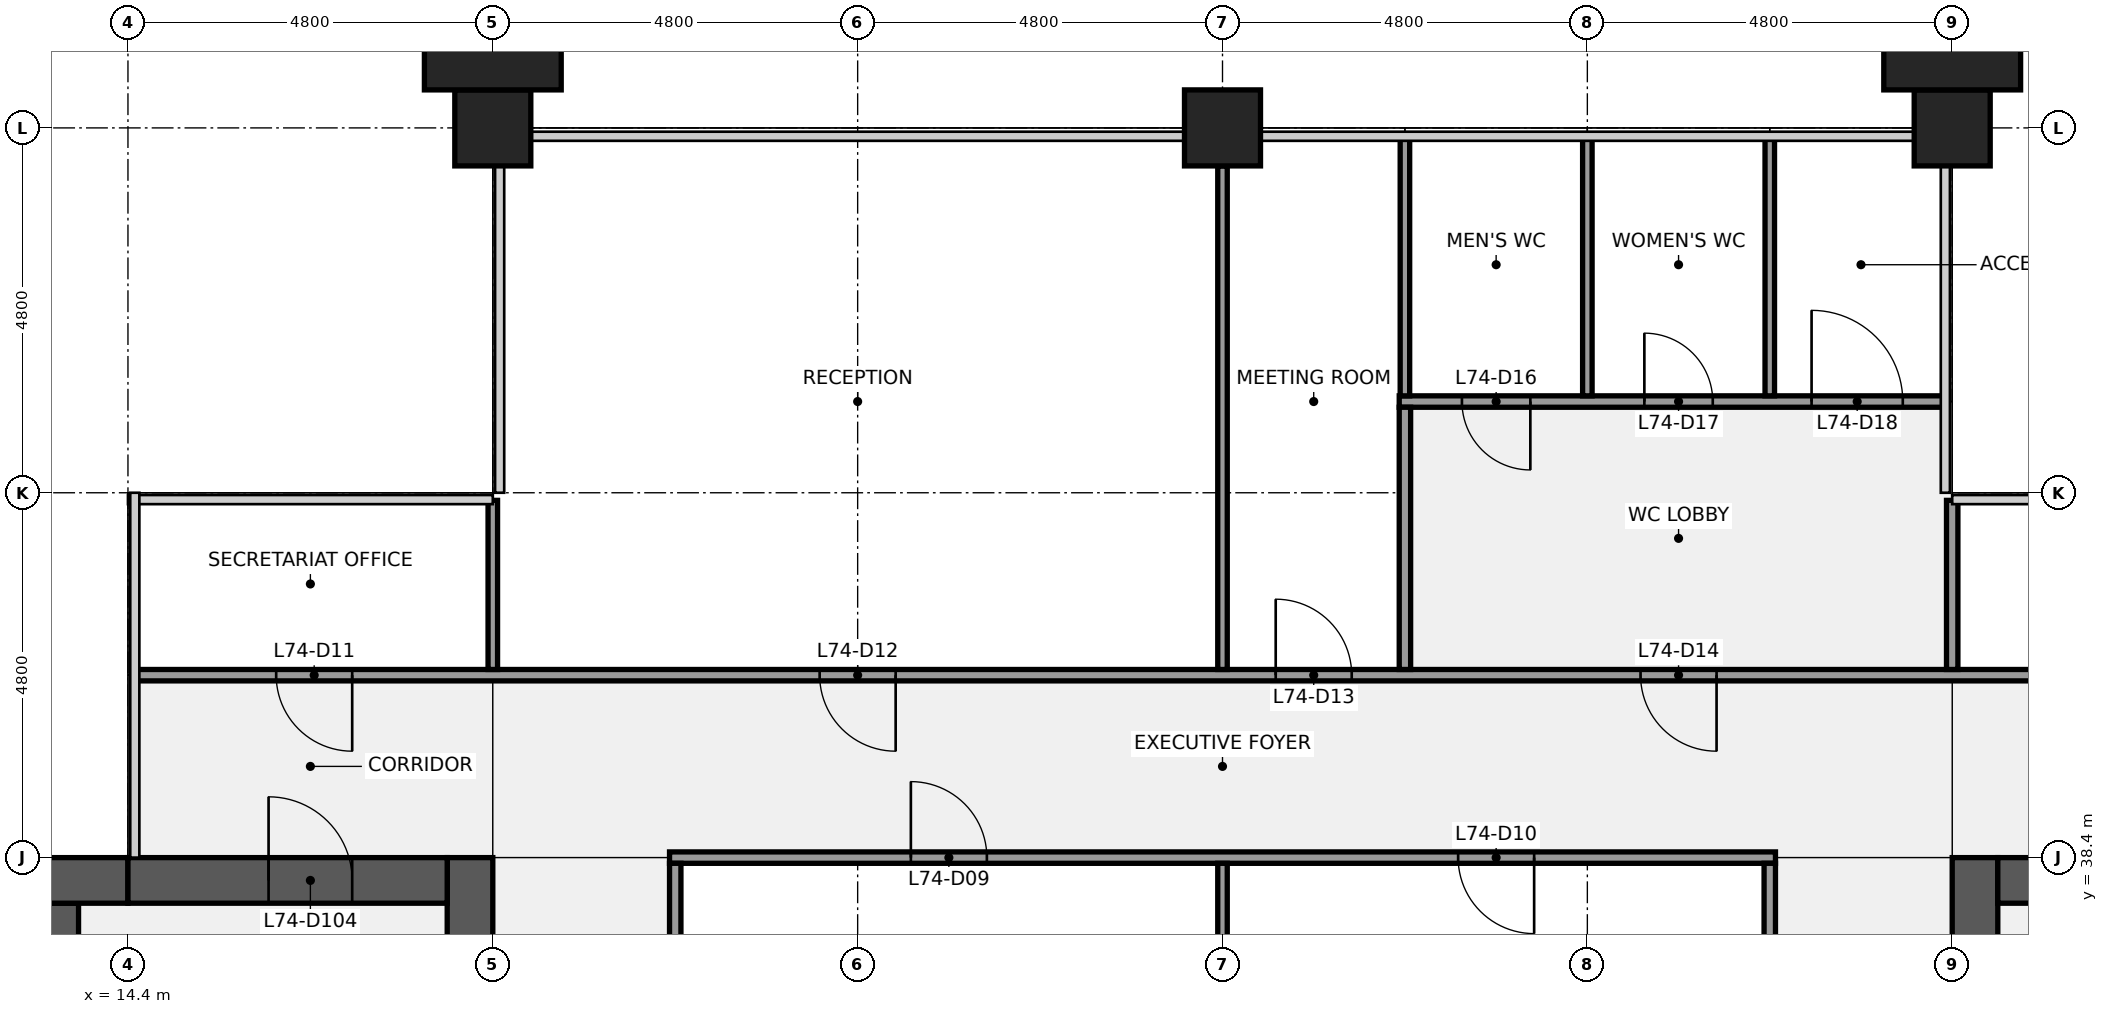
"""IFC4 building model, lengths in metres.
Left out: names, types, materials, properties, quantities, classifications, styles, units other than length and angle.
Written with IfcOpenShell. Run it as: python <this file> out.ifc"""

import sys

from ifc_helpers import new_model, si_unit, direction, frame, frame_2d, origin, origin_2d, place, context, subcontext, project, spatial, rectangle, extrude, element, fill, save


model = new_model("IFC4")
c1 = context("Model", 3, precision=1e-05, world=origin(), true_north=direction((0.0, 1.0)))
c2 = subcontext(c1, "Body", "Model", "MODEL_VIEW")
j1 = project(units=[si_unit("LENGTHUNIT", "METRE"), si_unit("PLANEANGLEUNIT", "RADIAN")], contexts=[c1])
p1 = place(None, origin())
s1 = spatial("IfcSite", under=j1, at=p1, CompositionType="ELEMENT")
p2 = place(p1, origin())
s2 = spatial("IfcBuilding", under=s1, at=p2, CompositionType="ELEMENT")
p3 = place(p2, frame((0.0, 0.0, 334.3)))
s3 = spatial("IfcBuildingStorey", under=s2, at=p3, CompositionType="ELEMENT", Elevation=334.3)
for number, where, z_axis, x_axis in (
    (1, (19.2, 48.0, 0.0), (0.0, 0.0, 1.0), (1.0, 0.0, 0.0)),
    (2, (28.8, 48.0, 0.0), (0.0, 0.0, 1.0), (1.0, 0.0, 0.0)),
    (3, (38.4, 48.0, 0.0), (0.0, 0.0, 1.0), (1.0, 0.0, 0.0)),
):
    element("IfcColumn", number, at=place(p3, frame(where, z_axis=z_axis, x_axis=x_axis)), inside=s3, PredefinedType="COLUMN", context=c2, shape_type="SweptSolid", body=[
        extrude(rectangle(XDim=1.0, YDim=1.0, at=origin_2d()), origin(), (0.0, 0.0, 1.0), 4.0),
    ])
p4 = place(p3, frame((18.9, 38.4, 0.0), z_axis=(0.0, 0.0, 1.0), x_axis=(0.0, -1.0, 0.0)))
e4 = element("IfcWall", 4, at=p4, inside=s3, PredefinedType="SHEAR", context=c2, shape_type="SweptSolid", body=[
    extrude(rectangle(XDim=28.8, YDim=0.6, at=frame_2d((14.4, 0.0))), origin(), (0.0, 0.0, 1.0), 3.84),
])
p5 = place(p4, frame((18.3, 0.0, 0.0)))
e5 = element("IfcOpeningElement", 5, at=p5, cuts=e4, PredefinedType="OPENING", context=c2, shape_type="SweptSolid", body=[
    extrude(rectangle(XDim=1.8, YDim=2.1, at=frame_2d((0.9, 1.05))), frame((0.0, 0.31, 0.0), z_axis=(0.0, -1.0, 0.0), x_axis=(1.0, 0.0, 0.0)), (0.0, 0.0, 1.0), 0.62),
])
p6 = place(p4, frame((8.7, 0.0, 0.0)))
e6 = element("IfcOpeningElement", 6, at=p6, cuts=e4, PredefinedType="OPENING", context=c2, shape_type="SweptSolid", body=[
    extrude(rectangle(XDim=1.8, YDim=2.1, at=frame_2d((0.9, 1.05))), frame((0.0, 0.31, 0.0), z_axis=(0.0, -1.0, 0.0), x_axis=(1.0, 0.0, 0.0)), (0.0, 0.0, 1.0), 0.62),
])
p7 = place(p3, frame((6.25, 37.5, 0.0), z_axis=(0.0, 0.0, 1.0), x_axis=(1.0, 0.0, 0.0)))
e7 = element("IfcWall", 7, at=p7, inside=s3, PredefinedType="SHEAR", context=c2, shape_type="SweptSolid", body=[
    extrude(rectangle(XDim=7.5, YDim=0.6, at=frame_2d((3.75, 0.0))), origin(), (0.0, 0.0, 1.0), 3.84),
])
p8 = place(p3, frame((0.6, 38.1, 0.0), z_axis=(0.0, 0.0, 1.0), x_axis=(1.0, 0.0, 0.0)))
e8 = element("IfcWall", 8, at=p8, inside=s3, PredefinedType="SHEAR", context=c2, shape_type="SweptSolid", body=[
    extrude(rectangle(XDim=13.8, YDim=0.6, at=frame_2d((6.9, 0.0))), origin(), (0.0, 0.0, 1.0), 3.84),
])
p9 = place(p8, frame((5.7, 0.0, 0.9)))
e9 = element("IfcOpeningElement", 9, at=p9, cuts=e8, PredefinedType="OPENING", context=c2, shape_type="SweptSolid", body=[
    extrude(rectangle(XDim=1.8, YDim=1.5, at=frame_2d((0.9, 0.75))), frame((0.0, 0.31, 0.0), z_axis=(0.0, -1.0, 0.0), x_axis=(1.0, 0.0, 0.0)), (0.0, 0.0, 1.0), 0.62),
])
p10 = place(p8, frame((10.5, 0.0, 0.9)))
e10 = element("IfcOpeningElement", 10, at=p10, cuts=e8, PredefinedType="OPENING", context=c2, shape_type="SweptSolid", body=[
    extrude(rectangle(XDim=1.8, YDim=1.5, at=frame_2d((0.9, 0.75))), frame((0.0, 0.31, 0.0), z_axis=(0.0, -1.0, 0.0), x_axis=(1.0, 0.0, 0.0)), (0.0, 0.0, 1.0), 0.62),
])
p11 = place(p3, frame((14.4, 38.1, 0.0), z_axis=(0.0, 0.0, 1.0), x_axis=(1.0, 0.0, 0.0)))
e11 = element("IfcWall", 11, at=p11, inside=s3, PredefinedType="SHEAR", context=c2, shape_type="SweptSolid", body=[
    extrude(rectangle(XDim=4.2, YDim=0.6, at=frame_2d((2.1, 0.0))), origin(), (0.0, 0.0, 1.0), 3.84),
])
p12 = place(p11, frame((1.85, 0.0, 0.0)))
e12 = element("IfcOpeningElement", 12, at=p12, cuts=e11, PredefinedType="OPENING", context=c2, shape_type="SweptSolid", body=[
    extrude(rectangle(XDim=1.1, YDim=2.1, at=frame_2d((0.55, 1.05))), frame((0.0, 0.31, 0.0), z_axis=(0.0, -1.0, 0.0), x_axis=(1.0, 0.0, 0.0)), (0.0, 0.0, 1.0), 0.62),
])
p13 = place(p3, frame((38.7, 9.6, 0.0), z_axis=(0.0, 0.0, 1.0), x_axis=(0.0, 1.0, 0.0)))
e13 = element("IfcWall", 13, at=p13, inside=s3, PredefinedType="SHEAR", context=c2, shape_type="SweptSolid", body=[
    extrude(rectangle(XDim=28.8, YDim=0.6, at=frame_2d((14.4, 0.0))), origin(), (0.0, 0.0, 1.0), 3.84),
])
p14 = place(p13, frame((8.7, 0.0, 0.0)))
e14 = element("IfcOpeningElement", 14, at=p14, cuts=e13, PredefinedType="OPENING", context=c2, shape_type="SweptSolid", body=[
    extrude(rectangle(XDim=1.8, YDim=2.1, at=frame_2d((0.9, 1.05))), frame((0.0, 0.31, 0.0), z_axis=(0.0, -1.0, 0.0), x_axis=(1.0, 0.0, 0.0)), (0.0, 0.0, 1.0), 0.62),
])
p15 = place(p13, frame((18.3, 0.0, 0.0)))
e15 = element("IfcOpeningElement", 15, at=p15, cuts=e13, PredefinedType="OPENING", context=c2, shape_type="SweptSolid", body=[
    extrude(rectangle(XDim=1.8, YDim=2.1, at=frame_2d((0.9, 1.05))), frame((0.0, 0.31, 0.0), z_axis=(0.0, -1.0, 0.0), x_axis=(1.0, 0.0, 0.0)), (0.0, 0.0, 1.0), 0.62),
])
p16 = place(p3, frame((39.0, 38.1, 0.0), z_axis=(0.0, 0.0, 1.0), x_axis=(1.0, 0.0, 0.0)))
e16 = element("IfcWall", 16, at=p16, inside=s3, PredefinedType="SHEAR", context=c2, shape_type="SweptSolid", body=[
    extrude(rectangle(XDim=4.2, YDim=0.6, at=frame_2d((2.1, 0.0))), origin(), (0.0, 0.0, 1.0), 3.84),
])
p17 = place(p16, frame((1.25, 0.0, 0.0)))
e17 = element("IfcOpeningElement", 17, at=p17, cuts=e16, PredefinedType="OPENING", context=c2, shape_type="SweptSolid", body=[
    extrude(rectangle(XDim=1.1, YDim=2.1, at=frame_2d((0.55, 1.05))), frame((0.0, 0.31, 0.0), z_axis=(0.0, -1.0, 0.0), x_axis=(1.0, 0.0, 0.0)), (0.0, 0.0, 1.0), 0.62),
])
p18 = place(p3, frame((21.525, 38.4, 0.0), z_axis=(0.0, 0.0, 1.0), x_axis=(1.0, 0.0, 0.0)))
e18 = element("IfcWall", 18, at=p18, inside=s3, PredefinedType="PARTITIONING", context=c2, shape_type="SweptSolid", body=[
    extrude(rectangle(XDim=14.55, YDim=0.15, at=frame_2d((7.275, 0.0))), origin(), (0.0, 0.0, 1.0), 2.849),
])
p19 = place(p18, frame((3.175, 0.0, 0.0)))
e19 = element("IfcOpeningElement", 19, at=p19, cuts=e18, PredefinedType="OPENING", context=c2, shape_type="SweptSolid", body=[
    extrude(rectangle(XDim=1.0, YDim=2.1, at=frame_2d((0.5, 1.05))), frame((0.0, 0.085, 0.0), z_axis=(0.0, -1.0, 0.0), x_axis=(1.0, 0.0, 0.0)), (0.0, 0.0, 1.0), 0.17),
])
p20 = place(p18, frame((10.375, 0.0, 0.0)))
e20 = element("IfcOpeningElement", 20, at=p20, cuts=e18, PredefinedType="OPENING", context=c2, shape_type="SweptSolid", body=[
    extrude(rectangle(XDim=1.0, YDim=2.1, at=frame_2d((0.5, 1.05))), frame((0.0, 0.085, 0.0), z_axis=(0.0, -1.0, 0.0), x_axis=(1.0, 0.0, 0.0)), (0.0, 0.0, 1.0), 0.17),
])
p21 = place(p3, frame((14.5, 40.8, 0.0), z_axis=(0.0, 0.0, 1.0), x_axis=(1.0, 0.0, 0.0)))
e21 = element("IfcWall", 21, at=p21, inside=s3, PredefinedType="PARTITIONING", context=c2, shape_type="SweptSolid", body=[
    extrude(rectangle(XDim=28.6, YDim=0.15, at=frame_2d((14.3, 0.0))), origin(), (0.0, 0.0, 1.0), 2.849),
])
p22 = place(p21, frame((1.85, 0.0, 0.0)))
e22 = element("IfcOpeningElement", 22, at=p22, cuts=e21, PredefinedType="OPENING", context=c2, shape_type="SweptSolid", body=[
    extrude(rectangle(XDim=1.0, YDim=2.1, at=frame_2d((0.5, 1.05))), frame((0.0, 0.085, 0.0), z_axis=(0.0, -1.0, 0.0), x_axis=(1.0, 0.0, 0.0)), (0.0, 0.0, 1.0), 0.17),
])
p23 = place(p21, frame((9.0, 0.0, 0.0)))
e23 = element("IfcOpeningElement", 23, at=p23, cuts=e21, PredefinedType="OPENING", context=c2, shape_type="SweptSolid", body=[
    extrude(rectangle(XDim=1.0, YDim=2.1, at=frame_2d((0.5, 1.05))), frame((0.0, 0.085, 0.0), z_axis=(0.0, -1.0, 0.0), x_axis=(1.0, 0.0, 0.0)), (0.0, 0.0, 1.0), 0.17),
])
p24 = place(p21, frame((15.0, 0.0, 0.0)))
e24 = element("IfcOpeningElement", 24, at=p24, cuts=e21, PredefinedType="OPENING", context=c2, shape_type="SweptSolid", body=[
    extrude(rectangle(XDim=1.0, YDim=2.1, at=frame_2d((0.5, 1.05))), frame((0.0, 0.085, 0.0), z_axis=(0.0, -1.0, 0.0), x_axis=(1.0, 0.0, 0.0)), (0.0, 0.0, 1.0), 0.17),
])
p25 = place(p21, frame((19.8, 0.0, 0.0)))
e25 = element("IfcOpeningElement", 25, at=p25, cuts=e21, PredefinedType="OPENING", context=c2, shape_type="SweptSolid", body=[
    extrude(rectangle(XDim=1.0, YDim=2.1, at=frame_2d((0.5, 1.05))), frame((0.0, 0.085, 0.0), z_axis=(0.0, -1.0, 0.0), x_axis=(1.0, 0.0, 0.0)), (0.0, 0.0, 1.0), 0.17),
])
p26 = place(p21, frame((25.75, 0.0, 0.0)))
e26 = element("IfcOpeningElement", 26, at=p26, cuts=e21, PredefinedType="OPENING", context=c2, shape_type="SweptSolid", body=[
    extrude(rectangle(XDim=1.0, YDim=2.1, at=frame_2d((0.5, 1.05))), frame((0.0, 0.085, 0.0), z_axis=(0.0, -1.0, 0.0), x_axis=(1.0, 0.0, 0.0)), (0.0, 0.0, 1.0), 0.17),
])
p27 = place(p3, frame((31.125, 44.4, 0.0), z_axis=(0.0, 0.0, 1.0), x_axis=(1.0, 0.0, 0.0)))
e27 = element("IfcWall", 27, at=p27, inside=s3, PredefinedType="PARTITIONING", context=c2, shape_type="SweptSolid", body=[
    extrude(rectangle(XDim=7.175, YDim=0.15, at=frame_2d((3.587, 0.0))), origin(), (0.0, 0.0, 1.0), 2.849),
])
p28 = place(p27, frame((0.825, 0.0, 0.0)))
e28 = element("IfcOpeningElement", 28, at=p28, cuts=e27, PredefinedType="OPENING", context=c2, shape_type="SweptSolid", body=[
    extrude(rectangle(XDim=0.9, YDim=2.1, at=frame_2d((0.45, 1.05))), frame((0.0, 0.085, 0.0), z_axis=(0.0, -1.0, 0.0), x_axis=(1.0, 0.0, 0.0)), (0.0, 0.0, 1.0), 0.17),
])
p29 = place(p27, frame((3.225, 0.0, 0.0)))
e29 = element("IfcOpeningElement", 29, at=p29, cuts=e27, PredefinedType="OPENING", context=c2, shape_type="SweptSolid", body=[
    extrude(rectangle(XDim=0.9, YDim=2.1, at=frame_2d((0.45, 1.05))), frame((0.0, 0.085, 0.0), z_axis=(0.0, -1.0, 0.0), x_axis=(1.0, 0.0, 0.0)), (0.0, 0.0, 1.0), 0.17),
])
p30 = place(p27, frame((5.425, 0.0, 0.0)))
e30 = element("IfcOpeningElement", 30, at=p30, cuts=e27, PredefinedType="OPENING", context=c2, shape_type="SweptSolid", body=[
    extrude(rectangle(XDim=1.2, YDim=2.1, at=frame_2d((0.6, 1.05))), frame((0.0, 0.085, 0.0), z_axis=(0.0, -1.0, 0.0), x_axis=(1.0, 0.0, 0.0)), (0.0, 0.0, 1.0), 0.17),
])
p31 = place(p3, frame((19.2, 40.875, 0.0), z_axis=(0.0, 0.0, 1.0), x_axis=(0.0, 1.0, 0.0)))
e31 = element("IfcWall", 31, at=p31, inside=s3, PredefinedType="PARTITIONING", context=c2, shape_type="SweptSolid", body=[
    extrude(rectangle(XDim=2.225, YDim=0.125, at=frame_2d((1.113, 0.0))), origin(), (0.0, 0.0, 1.0), 2.849),
])
p32 = place(p3, frame((21.6, 33.675, 0.0), z_axis=(0.0, 0.0, 1.0), x_axis=(0.0, 1.0, 0.0)))
e32 = element("IfcWall", 32, at=p32, inside=s3, PredefinedType="PARTITIONING", context=c2, shape_type="SweptSolid", body=[
    extrude(rectangle(XDim=4.65, YDim=0.15, at=frame_2d((2.325, 0.0))), origin(), (0.0, 0.0, 1.0), 2.849),
])
p33 = place(p3, frame((28.8, 33.663, 0.0), z_axis=(0.0, 0.0, 1.0), x_axis=(0.0, 1.0, 0.0)))
e33 = element("IfcWall", 33, at=p33, inside=s3, PredefinedType="PARTITIONING", context=c2, shape_type="SweptSolid", body=[
    extrude(rectangle(XDim=4.662, YDim=0.125, at=frame_2d((2.331, 0.0))), origin(), (0.0, 0.0, 1.0), 2.849),
])
p34 = place(p3, frame((28.8, 40.875, 0.0), z_axis=(0.0, 0.0, 1.0), x_axis=(0.0, 1.0, 0.0)))
e34 = element("IfcWall", 34, at=p34, inside=s3, PredefinedType="PARTITIONING", context=c2, shape_type="SweptSolid", body=[
    extrude(rectangle(XDim=6.625, YDim=0.125, at=frame_2d((3.312, 0.0))), origin(), (0.0, 0.0, 1.0), 2.849),
])
p35 = place(p3, frame((31.2, 44.475, 0.0), z_axis=(0.0, 0.0, 1.0), x_axis=(0.0, 1.0, 0.0)))
e35 = element("IfcWall", 35, at=p35, inside=s3, PredefinedType="PARTITIONING", context=c2, shape_type="SweptSolid", body=[
    extrude(rectangle(XDim=3.425, YDim=0.125, at=frame_2d((1.712, 0.0))), origin(), (0.0, 0.0, 1.0), 2.849),
])
p36 = place(p3, frame((31.2, 40.875, 0.0), z_axis=(0.0, 0.0, 1.0), x_axis=(0.0, 1.0, 0.0)))
e36 = element("IfcWall", 36, at=p36, inside=s3, PredefinedType="PARTITIONING", context=c2, shape_type="SweptSolid", body=[
    extrude(rectangle(XDim=3.45, YDim=0.15, at=frame_2d((1.725, 0.0))), origin(), (0.0, 0.0, 1.0), 2.849),
])
for number, where, z_axis, x_axis in (
    (37, (33.6, 44.475, 0.0), (0.0, 0.0, 1.0), (0.0, 1.0, 0.0)),
    (38, (36.0, 44.475, 0.0), (0.0, 0.0, 1.0), (0.0, 1.0, 0.0)),
):
    element("IfcWall", number, at=place(p3, frame(where, z_axis=z_axis, x_axis=x_axis)), inside=s3, PredefinedType="PARTITIONING", context=c2, shape_type="SweptSolid", body=[
        extrude(rectangle(XDim=3.425, YDim=0.125, at=frame_2d((1.712, 0.0))), origin(), (0.0, 0.0, 1.0), 2.849),
    ])
p37 = place(p3, frame((36.0, 33.675, 0.0), z_axis=(0.0, 0.0, 1.0), x_axis=(0.0, 1.0, 0.0)))
e39 = element("IfcWall", 39, at=p37, inside=s3, PredefinedType="PARTITIONING", context=c2, shape_type="SweptSolid", body=[
    extrude(rectangle(XDim=4.65, YDim=0.15, at=frame_2d((2.325, 0.0))), origin(), (0.0, 0.0, 1.0), 2.849),
])
p38 = place(p3, frame((38.4, 40.875, 0.0), z_axis=(0.0, 0.0, 1.0), x_axis=(0.0, 1.0, 0.0)))
e40 = element("IfcWall", 40, at=p38, inside=s3, PredefinedType="PARTITIONING", context=c2, shape_type="SweptSolid", body=[
    extrude(rectangle(XDim=2.225, YDim=0.15, at=frame_2d((1.113, 0.0))), origin(), (0.0, 0.0, 1.0), 2.849),
])
for number, where, z_axis, x_axis in (
    (41, (19.2, 49.0, 0.0), (0.0, 0.0, 1.0), (1.0, 0.0, 0.0)),
    (42, (38.4, 49.0, 0.0), (0.0, 0.0, 1.0), (1.0, 0.0, 0.0)),
):
    element("IfcColumn", number, at=place(p3, frame(where, z_axis=z_axis, x_axis=x_axis)), inside=s3, PredefinedType="PILASTER", context=c2, shape_type="SweptSolid", body=[
        extrude(rectangle(XDim=1.8, YDim=1.0, at=origin_2d()), origin(), (0.0, 0.0, 1.0), 4.0),
    ])
p39 = place(p12, origin())
e43 = element("IfcDoor", 43, at=p39, inside=s3, OperationType="SINGLE_SWING_LEFT", PredefinedType="DOOR", context=c2, shape_type="SweptSolid", body=[
    extrude(rectangle(XDim=1.1, YDim=2.1, at=frame_2d((0.55, 1.05))), frame((0.0, 0.025, 0.0), z_axis=(0.0, -1.0, 0.0), x_axis=(1.0, 0.0, 0.0)), (0.0, 0.0, 1.0), 0.05),
])
fill(e12, e43)
p40 = place(p19, origin())
e44 = element("IfcDoor", 44, at=p40, inside=s3, OperationType="SINGLE_SWING_LEFT", PredefinedType="DOOR", context=c2, shape_type="SweptSolid", body=[
    extrude(rectangle(XDim=1.0, YDim=2.1, at=frame_2d((0.5, 1.05))), frame((0.0, 0.025, 0.0), z_axis=(0.0, -1.0, 0.0), x_axis=(1.0, 0.0, 0.0)), (0.0, 0.0, 1.0), 0.05),
])
fill(e19, e44)
p41 = place(p20, origin())
e45 = element("IfcDoor", 45, at=p41, inside=s3, OperationType="SINGLE_SWING_RIGHT", PredefinedType="DOOR", context=c2, shape_type="SweptSolid", body=[
    extrude(rectangle(XDim=1.0, YDim=2.1, at=frame_2d((0.5, 1.05))), frame((0.0, 0.025, 0.0), z_axis=(0.0, -1.0, 0.0), x_axis=(1.0, 0.0, 0.0)), (0.0, 0.0, 1.0), 0.05),
])
fill(e20, e45)
p42 = place(p22, origin())
e46 = element("IfcDoor", 46, at=p42, inside=s3, OperationType="SINGLE_SWING_RIGHT", PredefinedType="DOOR", context=c2, shape_type="SweptSolid", body=[
    extrude(rectangle(XDim=1.0, YDim=2.1, at=frame_2d((0.5, 1.05))), frame((0.0, 0.025, 0.0), z_axis=(0.0, -1.0, 0.0), x_axis=(1.0, 0.0, 0.0)), (0.0, 0.0, 1.0), 0.05),
])
fill(e22, e46)
p43 = place(p23, origin())
e47 = element("IfcDoor", 47, at=p43, inside=s3, OperationType="SINGLE_SWING_RIGHT", PredefinedType="DOOR", context=c2, shape_type="SweptSolid", body=[
    extrude(rectangle(XDim=1.0, YDim=2.1, at=frame_2d((0.5, 1.05))), frame((0.0, 0.025, 0.0), z_axis=(0.0, -1.0, 0.0), x_axis=(1.0, 0.0, 0.0)), (0.0, 0.0, 1.0), 0.05),
])
fill(e23, e47)
p44 = place(p24, origin())
e48 = element("IfcDoor", 48, at=p44, inside=s3, OperationType="SINGLE_SWING_LEFT", PredefinedType="DOOR", context=c2, shape_type="SweptSolid", body=[
    extrude(rectangle(XDim=1.0, YDim=2.1, at=frame_2d((0.5, 1.05))), frame((0.0, 0.025, 0.0), z_axis=(0.0, -1.0, 0.0), x_axis=(1.0, 0.0, 0.0)), (0.0, 0.0, 1.0), 0.05),
])
fill(e24, e48)
p45 = place(p25, origin())
e49 = element("IfcDoor", 49, at=p45, inside=s3, OperationType="SINGLE_SWING_RIGHT", PredefinedType="DOOR", context=c2, shape_type="SweptSolid", body=[
    extrude(rectangle(XDim=1.0, YDim=2.1, at=frame_2d((0.5, 1.05))), frame((0.0, 0.025, 0.0), z_axis=(0.0, -1.0, 0.0), x_axis=(1.0, 0.0, 0.0)), (0.0, 0.0, 1.0), 0.05),
])
fill(e25, e49)
p46 = place(p28, origin())
e50 = element("IfcDoor", 50, at=p46, inside=s3, OperationType="SINGLE_SWING_RIGHT", PredefinedType="DOOR", context=c2, shape_type="SweptSolid", body=[
    extrude(rectangle(XDim=0.9, YDim=2.1, at=frame_2d((0.45, 1.05))), frame((0.0, 0.025, 0.0), z_axis=(0.0, -1.0, 0.0), x_axis=(1.0, 0.0, 0.0)), (0.0, 0.0, 1.0), 0.05),
])
fill(e28, e50)
p47 = place(p29, origin())
e51 = element("IfcDoor", 51, at=p47, inside=s3, OperationType="SINGLE_SWING_LEFT", PredefinedType="DOOR", context=c2, shape_type="SweptSolid", body=[
    extrude(rectangle(XDim=0.9, YDim=2.1, at=frame_2d((0.45, 1.05))), frame((0.0, 0.025, 0.0), z_axis=(0.0, -1.0, 0.0), x_axis=(1.0, 0.0, 0.0)), (0.0, 0.0, 1.0), 0.05),
])
fill(e29, e51)
p48 = place(p30, origin())
e52 = element("IfcDoor", 52, at=p48, inside=s3, OperationType="SINGLE_SWING_LEFT", PredefinedType="DOOR", context=c2, shape_type="SweptSolid", body=[
    extrude(rectangle(XDim=1.2, YDim=2.1, at=frame_2d((0.6, 1.05))), frame((0.0, 0.025, 0.0), z_axis=(0.0, -1.0, 0.0), x_axis=(1.0, 0.0, 0.0)), (0.0, 0.0, 1.0), 0.05),
])
fill(e30, e52)
save(model, sys.argv[1])
